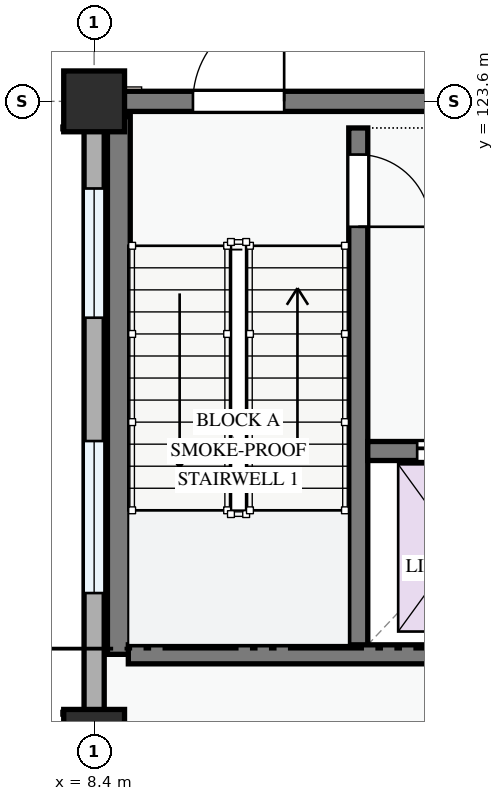
"""IFC4 building model, lengths in metres.
Left out: names, types, materials, properties, quantities, classifications, styles, units other than length and angle.
Written with IfcOpenShell. Run it as: python <this file> out.ifc"""

import sys

from ifc_helpers import new_model, si_unit, direction, frame, frame_2d, origin, origin_2d, place, context, subcontext, project, spatial, rectangle, extrude, element, fill, save


model = new_model("IFC4")
c1 = context("Model", 3, precision=1e-05, world=origin(), true_north=direction((0.0, 1.0)))
c2 = subcontext(c1, "Body", "Model", "MODEL_VIEW")
j1 = project(units=[si_unit("LENGTHUNIT", "METRE"), si_unit("PLANEANGLEUNIT", "RADIAN")], contexts=[c1])
p1 = place(None, origin())
s1 = spatial("IfcSite", under=j1, at=p1, CompositionType="ELEMENT")
p2 = place(p1, origin())
s2 = spatial("IfcBuilding", under=s1, at=p2, CompositionType="ELEMENT")
p3 = place(p2, origin())
s3 = spatial("IfcBuildingStorey", under=s2, at=p3, CompositionType="ELEMENT", Elevation=0.0)
for number, where, z_axis, x_axis in (
    (1, (8.4, 115.2, 0.0), (0.0, 0.0, 1.0), (1.0, 0.0, 0.0)),
    (2, (8.4, 123.6, 0.0), (0.0, 0.0, 1.0), (1.0, 0.0, 0.0)),
):
    element("IfcColumn", number, at=place(p3, frame(where, z_axis=z_axis, x_axis=x_axis)), inside=s3, PredefinedType="COLUMN", context=c2, shape_type="SweptSolid", body=[
        extrude(rectangle(XDim=0.8, YDim=0.8, at=origin_2d()), origin(), (0.0, 0.0, 1.0), 4.5),
    ])
p4 = place(p3, frame((14.4, 123.6, 0.0), z_axis=(0.0, 0.0, 1.0), x_axis=(-1.0, 0.0, 0.0)))
e3 = element("IfcWall", 3, at=p4, inside=s3, PredefinedType="STANDARD", context=c2, shape_type="SweptSolid", body=[
    extrude(rectangle(XDim=6.0, YDim=0.265, at=frame_2d((3.0, 0.0))), origin(), (0.0, 0.0, 1.0), 4.2),
])
p5 = place(p4, frame((3.5, 0.0, 0.0)))
e4 = element("IfcOpeningElement", 4, at=p5, cuts=e3, PredefinedType="OPENING", context=c2, shape_type="SweptSolid", body=[
    extrude(rectangle(XDim=1.2, YDim=2.2, at=frame_2d((0.6, 1.1))), frame((0.0, 0.143, 0.0), z_axis=(0.0, -1.0, 0.0), x_axis=(1.0, 0.0, 0.0)), (0.0, 0.0, 1.0), 0.285),
])
p6 = place(p3, frame((8.4, 123.6, 0.0), z_axis=(0.0, 0.0, 1.0), x_axis=(0.0, -1.0, 0.0)))
e5 = element("IfcWall", 5, at=p6, inside=s3, PredefinedType="STANDARD", context=c2, shape_type="SweptSolid", body=[
    extrude(rectangle(XDim=8.4, YDim=0.265, at=frame_2d((4.2, 0.0))), origin(), (0.0, 0.0, 1.0), 3.485),
])
p7 = place(p6, frame((1.146, 0.0, 0.78)))
e6 = element("IfcOpeningElement", 6, at=p7, cuts=e5, PredefinedType="OPENING", context=c2, shape_type="SweptSolid", body=[
    extrude(rectangle(XDim=1.7, YDim=1.6, at=frame_2d((0.85, 0.8))), frame((0.0, 0.143, 0.0), z_axis=(0.0, -1.0, 0.0), x_axis=(1.0, 0.0, 0.0)), (0.0, 0.0, 1.0), 0.285),
])
p8 = place(p6, frame((4.469, 0.0, 0.78)))
e7 = element("IfcOpeningElement", 7, at=p8, cuts=e5, PredefinedType="OPENING", context=c2, shape_type="SweptSolid", body=[
    extrude(rectangle(XDim=2.0, YDim=1.5, at=frame_2d((1.0, 0.75))), frame((0.0, 0.143, 0.0), z_axis=(0.0, -1.0, 0.0), x_axis=(1.0, 0.0, 0.0)), (0.0, 0.0, 1.0), 0.285),
])
p9 = place(p3, frame((11.875, 123.25, 0.0), z_axis=(0.0, 0.0, 1.0), x_axis=(0.0, -1.0, 0.0)))
e8 = element("IfcWall", 8, at=p9, inside=s3, PredefinedType="SHEAR", context=c2, shape_type="SweptSolid", body=[
    extrude(rectangle(XDim=6.925, YDim=0.25, at=frame_2d((3.462, 0.0))), origin(), (0.0, 0.0, 1.0), 4.2),
])
p10 = place(p9, frame((0.35, 0.0, 0.0)))
e9 = element("IfcOpeningElement", 9, at=p10, cuts=e8, PredefinedType="OPENING", context=c2, shape_type="SweptSolid", body=[
    extrude(rectangle(XDim=0.95, YDim=2.1, at=frame_2d((0.475, 1.05))), frame((0.0, 0.135, 0.0), z_axis=(0.0, -1.0, 0.0), x_axis=(1.0, 0.0, 0.0)), (0.0, 0.0, 1.0), 0.27),
])
p11 = place(p3, frame((8.725, 123.4, 0.0), z_axis=(0.0, 0.0, 1.0), x_axis=(0.0, -1.0, 0.0)))
e10 = element("IfcWall", 10, at=p11, inside=s3, PredefinedType="SHEAR", context=c2, shape_type="SweptSolid", body=[
    extrude(rectangle(XDim=7.075, YDim=0.3, at=frame_2d((3.538, 0.0))), origin(), (0.0, 0.0, 1.0), 4.2),
])
p12 = place(p3, frame((12.0, 119.0, 0.0), z_axis=(0.0, 0.0, 1.0), x_axis=(1.0, 0.0, 0.0)))
e11 = element("IfcWall", 11, at=p12, inside=s3, PredefinedType="SHEAR", context=c2, shape_type="SweptSolid", body=[
    extrude(rectangle(XDim=2.425, YDim=0.25, at=frame_2d((1.212, 0.0))), origin(), (0.0, 0.0, 1.0), 4.2),
])
p13 = place(p12, frame((0.65, 0.0, 0.0)))
e12 = element("IfcOpeningElement", 12, at=p13, cuts=e11, PredefinedType="OPENING", context=c2, shape_type="SweptSolid", body=[
    extrude(rectangle(XDim=1.1, YDim=2.15, at=frame_2d((0.55, 1.075))), frame((0.0, 0.135, 0.0), z_axis=(0.0, -1.0, 0.0), x_axis=(1.0, 0.0, 0.0)), (0.0, 0.0, 1.0), 0.27),
])
p14 = place(p3, frame((8.85, 116.325, 0.0), z_axis=(0.0, 0.0, 1.0), x_axis=(1.0, 0.0, 0.0)))
e13 = element("IfcWall", 13, at=p14, inside=s3, PredefinedType="SHEAR", context=c2, shape_type="SweptSolid", body=[
    extrude(rectangle(XDim=13.5, YDim=0.25, at=frame_2d((6.75, 0.0))), origin(), (0.0, 0.0, 1.0), 4.2),
])
p15 = place(p14, frame((6.2, 0.0, 0.0)))
e14 = element("IfcOpeningElement", 14, at=p15, cuts=e13, PredefinedType="OPENING", context=c2, shape_type="SweptSolid", body=[
    extrude(rectangle(XDim=1.1, YDim=2.15, at=frame_2d((0.55, 1.075))), frame((0.0, 0.135, 0.0), z_axis=(0.0, -1.0, 0.0), x_axis=(1.0, 0.0, 0.0)), (0.0, 0.0, 1.0), 0.27),
])
p16 = place(p5, frame((1.2, 0.0, 0.0), z_axis=(0.0, 0.0, 1.0), x_axis=(-1.0, 0.0, 0.0)))
e15 = element("IfcDoor", 15, at=p16, inside=s3, OperationType="SINGLE_SWING_RIGHT", PredefinedType="DOOR", context=c2, shape_type="SweptSolid", body=[
    extrude(rectangle(XDim=1.2, YDim=2.2, at=frame_2d((0.6, 1.1))), frame((0.0, 0.025, 0.0), z_axis=(0.0, -1.0, 0.0), x_axis=(1.0, 0.0, 0.0)), (0.0, 0.0, 1.0), 0.05),
])
fill(e4, e15)
p17 = place(p7, origin())
e16 = element("IfcWindow", 16, at=p17, inside=s3, PartitioningType="DOUBLE_PANEL_VERTICAL", PredefinedType="WINDOW", context=c2, shape_type="SweptSolid", body=[
    extrude(rectangle(XDim=1.7, YDim=1.6, at=frame_2d((0.85, 0.8))), frame((0.0, 0.03, 0.0), z_axis=(0.0, -1.0, 0.0), x_axis=(1.0, 0.0, 0.0)), (0.0, 0.0, 1.0), 0.06),
])
fill(e6, e16)
p18 = place(p8, origin())
e17 = element("IfcWindow", 17, at=p18, inside=s3, PartitioningType="DOUBLE_PANEL_VERTICAL", PredefinedType="WINDOW", context=c2, shape_type="SweptSolid", body=[
    extrude(rectangle(XDim=2.0, YDim=1.5, at=frame_2d((1.0, 0.75))), frame((0.0, 0.03, 0.0), z_axis=(0.0, -1.0, 0.0), x_axis=(1.0, 0.0, 0.0)), (0.0, 0.0, 1.0), 0.06),
])
fill(e7, e17)
p19 = place(p10, origin())
e18 = element("IfcDoor", 18, at=p19, inside=s3, OperationType="SINGLE_SWING_RIGHT", PredefinedType="DOOR", context=c2, shape_type="SweptSolid", body=[
    extrude(rectangle(XDim=0.95, YDim=2.1, at=frame_2d((0.475, 1.05))), frame((0.0, 0.025, 0.0), z_axis=(0.0, -1.0, 0.0), x_axis=(1.0, 0.0, 0.0)), (0.0, 0.0, 1.0), 0.05),
])
fill(e9, e18)
p20 = place(p13, origin())
e19 = element("IfcDoor", 19, at=p20, inside=s3, OperationType="SLIDING_TO_LEFT", PredefinedType="DOOR", context=c2, shape_type="SweptSolid", body=[
    extrude(rectangle(XDim=1.1, YDim=2.15, at=frame_2d((0.55, 1.075))), frame((0.0, 0.025, 0.0), z_axis=(0.0, -1.0, 0.0), x_axis=(1.0, 0.0, 0.0)), (0.0, 0.0, 1.0), 0.05),
])
fill(e12, e19)
save(model, sys.argv[1])
